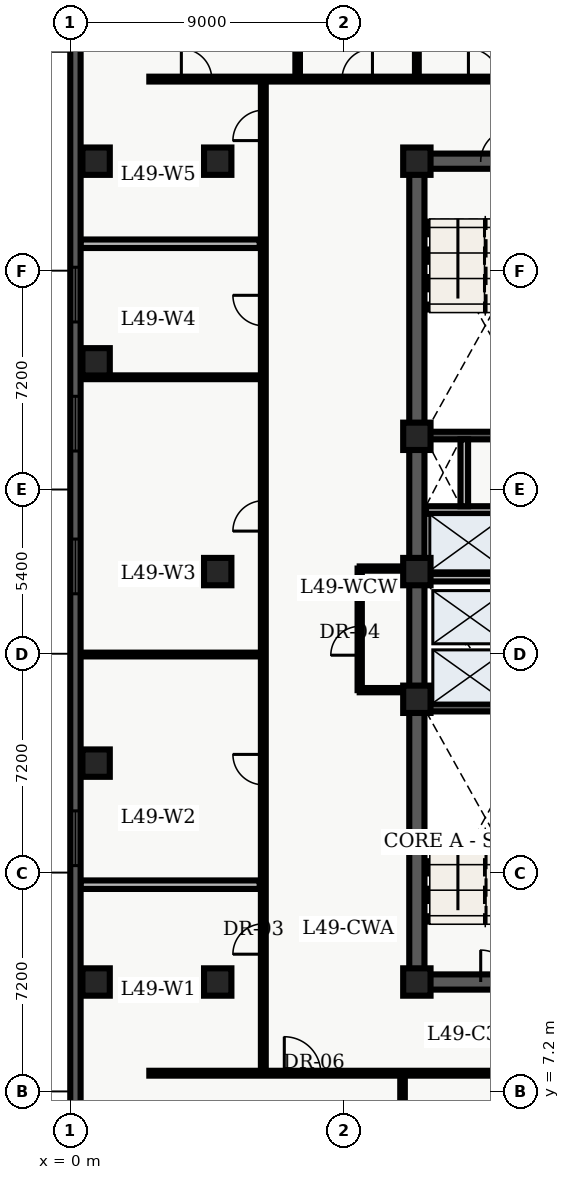
"""IFC4 building model, lengths in metres.
Left out: names, types, materials, properties, quantities, classifications, styles, units other than length and angle.
Written with IfcOpenShell. Run it as: python <this file> out.ifc"""

import sys

from ifc_helpers import new_model, entity, si_unit, converted_unit, direction, frame, origin_with_axes, origin_2d_with_axis, place, context, subcontext, project, spatial, polyline, rectangle, outline, extrude, element, fill, save


model = new_model("IFC4")
c1 = context("Model", 3, precision=1e-05, world=origin_with_axes(), true_north=direction((0.0, 1.0)))
c2 = subcontext(c1, "Body", "Model", "MODEL_VIEW")
j1 = project(units=[si_unit("LENGTHUNIT", "METRE"), converted_unit("PLANEANGLEUNIT", "DEGREE", entity("IfcPlaneAngleMeasure", 0.017), si_unit("PLANEANGLEUNIT", "RADIAN"), dimensions=[0, 0, 0, 0, 0, 0, 0])], contexts=[c1])
p1 = place(None, origin_with_axes())
s1 = spatial("IfcSite", under=j1, at=p1, CompositionType="ELEMENT")
p2 = place(p1, origin_with_axes())
s2 = spatial("IfcBuilding", under=s1, at=p2, CompositionType="ELEMENT")
p3 = place(p2, frame((0.0, 0.0, 200.4), z_axis=(0.0, 0.0, 1.0), x_axis=(1.0, 0.0, 0.0)))
s3 = spatial("IfcBuildingStorey", under=s2, at=p3, CompositionType="ELEMENT", Elevation=200.4)
p4 = place(p3, frame((11.4, 10.8, 0.0), z_axis=(0.0, 0.0, 1.0), x_axis=(0.0, 1.0, 0.0)))
e1 = element("IfcWall", 1, at=p4, inside=s3, PredefinedType="SHEAR", context=c2, shape_type="SweptSolid", body=[
    extrude(outline(polyline([(0.0, -0.25), (27.0, -0.25), (27.0, 0.25), (0.0, 0.25), (0.0, -0.25)])), origin_with_axes(), (0.0, 0.0, 1.0), 3.66),
])
p5 = place(p3, frame((11.4, 10.8, 0.0), z_axis=(0.0, 0.0, 1.0), x_axis=(1.0, 0.0, 0.0)))
e2 = element("IfcWall", 2, at=p5, inside=s3, PredefinedType="SHEAR", context=c2, shape_type="SweptSolid", body=[
    extrude(outline(polyline([(0.0, -0.25), (7.2, -0.25), (7.2, 0.25), (0.0, 0.25), (0.0, -0.25)])), origin_with_axes(), (0.0, 0.0, 1.0), 3.66),
])
p6 = place(p5, frame((2.625, 0.0, 0.0), z_axis=(0.0, 0.0, 1.0), x_axis=(1.0, 0.0, 0.0)))
e3 = element("IfcOpeningElement", 3, at=p6, cuts=e2, PredefinedType="OPENING", context=c2, shape_type="SweptSolid", body=[
    extrude(rectangle(XDim=1.05, YDim=0.52, at=origin_2d_with_axis()), origin_with_axes(), (0.0, 0.0, 1.0), 2.15),
])
p7 = place(p3, frame((11.4, 37.8, 0.0), z_axis=(0.0, 0.0, 1.0), x_axis=(1.0, 0.0, 0.0)))
e4 = element("IfcWall", 4, at=p7, inside=s3, PredefinedType="SHEAR", context=c2, shape_type="SweptSolid", body=[
    extrude(outline(polyline([(0.0, -0.25), (7.2, -0.25), (7.2, 0.25), (0.0, 0.25), (0.0, -0.25)])), origin_with_axes(), (0.0, 0.0, 1.0), 3.66),
])
p8 = place(p7, frame((2.625, 0.0, 0.0), z_axis=(0.0, 0.0, 1.0), x_axis=(1.0, 0.0, 0.0)))
e5 = element("IfcOpeningElement", 5, at=p8, cuts=e4, PredefinedType="OPENING", context=c2, shape_type="SweptSolid", body=[
    extrude(rectangle(XDim=1.05, YDim=0.52, at=origin_2d_with_axis()), origin_with_axes(), (0.0, 0.0, 1.0), 2.15),
])
for number, where, z_axis, x_axis in (
    (6, (11.65, 19.825, 0.0), (0.0, 0.0, 1.0), (1.0, 0.0, 0.0)),
    (7, (11.65, 28.775, 0.0), (0.0, 0.0, 1.0), (1.0, 0.0, 0.0)),
):
    element("IfcWall", number, at=place(p3, frame(where, z_axis=z_axis, x_axis=x_axis)), inside=s3, PredefinedType="SHEAR", context=c2, shape_type="SweptSolid", body=[
        extrude(outline(polyline([(0.0, -0.125), (6.7, -0.125), (6.7, 0.125), (0.0, 0.125), (0.0, -0.125)])), origin_with_axes(), (0.0, 0.0, 1.0), 3.66),
    ])
p9 = place(p3, frame((11.7, 24.1, 0.0), z_axis=(0.0, 0.0, 1.0), x_axis=(1.0, 0.0, 0.0)))
e8 = element("IfcWall", 8, at=p9, inside=s3, PredefinedType="SOLIDWALL", context=c2, shape_type="SweptSolid", body=[
    extrude(outline(polyline([(0.0, -0.125), (6.6, -0.125), (6.6, 0.125), (0.0, 0.125), (0.0, -0.125)])), origin_with_axes(), (0.0, 0.0, 1.0), 2.7),
])
p10 = place(p9, frame((3.75, 0.0, 0.0), z_axis=(0.0, 0.0, 1.0), x_axis=(1.0, 0.0, 0.0)))
e9 = element("IfcOpeningElement", 9, at=p10, cuts=e8, PredefinedType="OPENING", context=c2, shape_type="SweptSolid", body=[
    extrude(rectangle(XDim=0.9, YDim=0.27, at=origin_2d_with_axis()), origin_with_axes(), (0.0, 0.0, 1.0), 2.15),
])
p11 = place(p3, frame((11.7, 26.325, 0.0), z_axis=(0.0, 0.0, 1.0), x_axis=(1.0, 0.0, 0.0)))
e10 = element("IfcWall", 10, at=p11, inside=s3, PredefinedType="SOLIDWALL", context=c2, shape_type="SweptSolid", body=[
    extrude(outline(polyline([(0.0, -0.125), (6.6, -0.125), (6.6, 0.125), (0.0, 0.125), (0.0, -0.125)])), origin_with_axes(), (0.0, 0.0, 1.0), 2.7),
])
p12 = place(p11, frame((3.5, 0.0, 0.0), z_axis=(0.0, 0.0, 1.0), x_axis=(1.0, 0.0, 0.0)))
e11 = element("IfcOpeningElement", 11, at=p12, cuts=e10, PredefinedType="OPENING", context=c2, shape_type="SweptSolid", body=[
    extrude(rectangle(XDim=0.9, YDim=0.27, at=origin_2d_with_axis()), origin_with_axes(), (0.0, 0.0, 1.0), 2.15),
])
p13 = place(p3, frame((12.96, 26.45, 0.0), z_axis=(0.0, 0.0, 1.0), x_axis=(0.0, 1.0, 0.0)))
e12 = element("IfcWall", 12, at=p13, inside=s3, PredefinedType="SOLIDWALL", context=c2, shape_type="SweptSolid", body=[
    extrude(outline(polyline([(0.0, -0.125), (2.2, -0.125), (2.2, 0.125), (0.0, 0.125), (0.0, -0.125)])), origin_with_axes(), (0.0, 0.0, 1.0), 2.7),
])
for number, where, z_axis, x_axis in (
    (13, (11.4, 10.8, 0.0), (0.0, 0.0, 1.0), (1.0, 0.0, 0.0)),
    (14, (11.4, 20.1, 0.0), (0.0, 0.0, 1.0), (1.0, 0.0, 0.0)),
    (15, (11.4, 24.3, 0.0), (0.0, 0.0, 1.0), (1.0, 0.0, 0.0)),
    (16, (11.4, 28.75, 0.0), (0.0, 0.0, 1.0), (1.0, 0.0, 0.0)),
    (17, (11.4, 37.8, 0.0), (0.0, 0.0, 1.0), (1.0, 0.0, 0.0)),
    (18, (4.85, 10.8, 0.0), (0.0, 0.0, 1.0), (1.0, 0.0, 0.0)),
    (19, (4.85, 24.3, 0.0), (0.0, 0.0, 1.0), (1.0, 0.0, 0.0)),
    (20, (4.85, 37.8, 0.0), (0.0, 0.0, 1.0), (1.0, 0.0, 0.0)),
    (21, (0.85, 10.8, 0.0), (0.0, 0.0, 1.0), (1.0, 0.0, 0.0)),
    (22, (0.85, 18.0, 0.0), (0.0, 0.0, 1.0), (1.0, 0.0, 0.0)),
    (23, (0.85, 31.2, 0.0), (0.0, 0.0, 1.0), (1.0, 0.0, 0.0)),
    (24, (0.85, 37.8, 0.0), (0.0, 0.0, 1.0), (1.0, 0.0, 0.0)),
):
    element("IfcColumn", number, at=place(p3, frame(where, z_axis=z_axis, x_axis=x_axis)), inside=s3, PredefinedType="COLUMN", context=c2, shape_type="SweptSolid", body=[
        extrude(rectangle(XDim=0.9, YDim=0.9, at=origin_2d_with_axis()), origin_with_axes(), (0.0, 0.0, 1.0), 3.9),
    ])
p14 = place(p3, frame((9.52, 20.4, 0.0), z_axis=(0.0, 0.0, 1.0), x_axis=(0.0, 1.0, 0.0)))
e25 = element("IfcWall", 25, at=p14, inside=s3, PredefinedType="PARTITIONING", context=c2, shape_type="SweptSolid", body=[
    extrude(outline(polyline([(0.0, -0.07), (4.0, -0.07), (4.0, 0.07), (0.0, 0.07), (0.0, -0.07)])), origin_with_axes(), (0.0, 0.0, 1.0), 2.7),
])
p15 = place(p14, frame((1.625, 0.0, 0.0), z_axis=(0.0, 0.0, 1.0), x_axis=(1.0, 0.0, 0.0)))
e26 = element("IfcOpeningElement", 26, at=p15, cuts=e25, PredefinedType="OPENING", context=c2, shape_type="SweptSolid", body=[
    extrude(rectangle(XDim=0.95, YDim=0.16, at=origin_2d_with_axis()), origin_with_axes(), (0.0, 0.0, 1.0), 2.15),
])
for number, where, z_axis, x_axis in (
    (27, (9.52, 20.4, 0.0), (0.0, 0.0, 1.0), (1.0, 0.0, 0.0)),
    (28, (9.52, 24.4, 0.0), (0.0, 0.0, 1.0), (1.0, 0.0, 0.0)),
):
    element("IfcWall", number, at=place(p3, frame(where, z_axis=z_axis, x_axis=x_axis)), inside=s3, PredefinedType="PARTITIONING", context=c2, shape_type="SweptSolid", body=[
        extrude(outline(polyline([(0.0, -0.07), (1.58, -0.07), (1.58, 0.07), (0.0, 0.07), (0.0, -0.07)])), origin_with_axes(), (0.0, 0.0, 1.0), 2.7),
    ])
p16 = place(p3, frame((2.6, 7.8, 0.0), z_axis=(0.0, 0.0, 1.0), x_axis=(1.0, 0.0, 0.0)))
e29 = element("IfcWall", 29, at=p16, inside=s3, PredefinedType="PARTITIONING", context=c2, shape_type="SweptSolid", body=[
    extrude(outline(polyline([(0.0, -0.08), (18.55, -0.08), (18.55, 0.08), (0.0, 0.08), (0.0, -0.08)])), origin_with_axes(), (0.0, 0.0, 1.0), 2.7),
])
p17 = place(p16, frame((5.04, 0.0, 0.0), z_axis=(0.0, 0.0, 1.0), x_axis=(1.0, 0.0, 0.0)))
e30 = element("IfcOpeningElement", 30, at=p17, cuts=e29, PredefinedType="OPENING", context=c2, shape_type="SweptSolid", body=[
    extrude(rectangle(XDim=1.2, YDim=0.18, at=origin_2d_with_axis()), origin_with_axes(), (0.0, 0.0, 1.0), 2.2),
])
p18 = place(p16, frame((13.415, 0.0, 0.0), z_axis=(0.0, 0.0, 1.0), x_axis=(1.0, 0.0, 0.0)))
e31 = element("IfcOpeningElement", 31, at=p18, cuts=e29, PredefinedType="OPENING", context=c2, shape_type="SweptSolid", body=[
    extrude(rectangle(XDim=1.0, YDim=0.18, at=origin_2d_with_axis()), origin_with_axes(), (0.0, 0.0, 1.0), 2.15),
])
p19 = place(p3, frame((2.6, 40.5, 0.0), z_axis=(0.0, 0.0, 1.0), x_axis=(1.0, 0.0, 0.0)))
e32 = element("IfcWall", 32, at=p19, inside=s3, PredefinedType="PARTITIONING", context=c2, shape_type="SweptSolid", body=[
    extrude(outline(polyline([(0.0, -0.08), (26.177, -0.08), (26.177, 0.08), (0.0, 0.08), (0.0, -0.08)])), origin_with_axes(), (0.0, 0.0, 1.0), 2.7),
])
p20 = place(p19, frame((1.554, 0.0, 0.0), z_axis=(0.0, 0.0, 1.0), x_axis=(1.0, 0.0, 0.0)))
e33 = element("IfcOpeningElement", 33, at=p20, cuts=e32, PredefinedType="OPENING", context=c2, shape_type="SweptSolid", body=[
    extrude(rectangle(XDim=1.0, YDim=0.18, at=origin_2d_with_axis()), origin_with_axes(), (0.0, 0.0, 1.0), 2.15),
])
p21 = place(p19, frame((6.84, 0.0, 0.0), z_axis=(0.0, 0.0, 1.0), x_axis=(1.0, 0.0, 0.0)))
e34 = element("IfcOpeningElement", 34, at=p21, cuts=e32, PredefinedType="OPENING", context=c2, shape_type="SweptSolid", body=[
    extrude(rectangle(XDim=1.0, YDim=0.18, at=origin_2d_with_axis()), origin_with_axes(), (0.0, 0.0, 1.0), 2.15),
])
p22 = place(p19, frame((10.996, 0.0, 0.0), z_axis=(0.0, 0.0, 1.0), x_axis=(1.0, 0.0, 0.0)))
e35 = element("IfcOpeningElement", 35, at=p22, cuts=e32, PredefinedType="OPENING", context=c2, shape_type="SweptSolid", body=[
    extrude(rectangle(XDim=1.0, YDim=0.18, at=origin_2d_with_axis()), origin_with_axes(), (0.0, 0.0, 1.0), 2.15),
])
p23 = place(p19, frame((15.636, 0.0, 0.0), z_axis=(0.0, 0.0, 1.0), x_axis=(1.0, 0.0, 0.0)))
e36 = element("IfcOpeningElement", 36, at=p23, cuts=e32, PredefinedType="OPENING", context=c2, shape_type="SweptSolid", body=[
    extrude(rectangle(XDim=1.0, YDim=0.18, at=origin_2d_with_axis()), origin_with_axes(), (0.0, 0.0, 1.0), 2.15),
])
p24 = place(p3, frame((6.35, 7.8, 0.0), z_axis=(0.0, 0.0, 1.0), x_axis=(0.0, 1.0, 0.0)))
e37 = element("IfcWall", 37, at=p24, inside=s3, PredefinedType="PARTITIONING", context=c2, shape_type="SweptSolid", body=[
    extrude(outline(polyline([(0.0, -0.08), (32.7, -0.08), (32.7, 0.08), (0.0, 0.08), (0.0, -0.08)])), origin_with_axes(), (0.0, 0.0, 1.0), 2.7),
])
p25 = place(p24, frame((4.415, 0.0, 0.0), z_axis=(0.0, 0.0, 1.0), x_axis=(1.0, 0.0, 0.0)))
e38 = element("IfcOpeningElement", 38, at=p25, cuts=e37, PredefinedType="OPENING", context=c2, shape_type="SweptSolid", body=[
    extrude(rectangle(XDim=1.0, YDim=0.18, at=origin_2d_with_axis()), origin_with_axes(), (0.0, 0.0, 1.0), 2.15),
])
p26 = place(p24, frame((9.986, 0.0, 0.0), z_axis=(0.0, 0.0, 1.0), x_axis=(1.0, 0.0, 0.0)))
e39 = element("IfcOpeningElement", 39, at=p26, cuts=e37, PredefinedType="OPENING", context=c2, shape_type="SweptSolid", body=[
    extrude(rectangle(XDim=1.0, YDim=0.18, at=origin_2d_with_axis()), origin_with_axes(), (0.0, 0.0, 1.0), 2.15),
])
p27 = place(p24, frame((18.332, 0.0, 0.0), z_axis=(0.0, 0.0, 1.0), x_axis=(1.0, 0.0, 0.0)))
e40 = element("IfcOpeningElement", 40, at=p27, cuts=e37, PredefinedType="OPENING", context=c2, shape_type="SweptSolid", body=[
    extrude(rectangle(XDim=1.0, YDim=0.18, at=origin_2d_with_axis()), origin_with_axes(), (0.0, 0.0, 1.0), 2.15),
])
p28 = place(p24, frame((25.088, 0.0, 0.0), z_axis=(0.0, 0.0, 1.0), x_axis=(1.0, 0.0, 0.0)))
e41 = element("IfcOpeningElement", 41, at=p28, cuts=e37, PredefinedType="OPENING", context=c2, shape_type="SweptSolid", body=[
    extrude(rectangle(XDim=1.0, YDim=0.18, at=origin_2d_with_axis()), origin_with_axes(), (0.0, 0.0, 1.0), 2.15),
])
p29 = place(p24, frame((31.177, 0.0, 0.0), z_axis=(0.0, 0.0, 1.0), x_axis=(1.0, 0.0, 0.0)))
e42 = element("IfcOpeningElement", 42, at=p29, cuts=e37, PredefinedType="OPENING", context=c2, shape_type="SweptSolid", body=[
    extrude(rectangle(XDim=1.0, YDim=0.18, at=origin_2d_with_axis()), origin_with_axes(), (0.0, 0.0, 1.0), 2.15),
])
p30 = place(p3, frame((0.335, 14.001, 0.0), z_axis=(0.0, 0.0, 1.0), x_axis=(1.0, 0.0, 0.0)))
e43 = element("IfcWall", 43, at=p30, inside=s3, PredefinedType="PARTITIONING", context=c2, shape_type="SweptSolid", body=[
    extrude(outline(polyline([(0.0, -0.14), (5.895, -0.14), (5.895, 0.14), (0.0, 0.14), (0.0, -0.14)])), origin_with_axes(), (0.0, 0.0, 1.0), 2.7),
])
for number, where, z_axis, x_axis in (
    (44, (0.335, 21.572, 0.0), (0.0, 0.0, 1.0), (1.0, 0.0, 0.0)),
    (45, (0.335, 30.692, 0.0), (0.0, 0.0, 1.0), (1.0, 0.0, 0.0)),
):
    element("IfcWall", number, at=place(p3, frame(where, z_axis=z_axis, x_axis=x_axis)), inside=s3, PredefinedType="PARTITIONING", context=c2, shape_type="SweptSolid", body=[
        extrude(outline(polyline([(0.0, -0.062), (5.895, -0.062), (5.895, 0.062), (0.0, 0.062), (0.0, -0.062)])), origin_with_axes(), (0.0, 0.0, 1.0), 2.7),
    ])
p31 = place(p3, frame((0.335, 35.084, 0.0), z_axis=(0.0, 0.0, 1.0), x_axis=(1.0, 0.0, 0.0)))
e46 = element("IfcWall", 46, at=p31, inside=s3, PredefinedType="PARTITIONING", context=c2, shape_type="SweptSolid", body=[
    extrude(outline(polyline([(0.0, -0.14), (5.895, -0.14), (5.895, 0.14), (0.0, 0.14), (0.0, -0.14)])), origin_with_axes(), (0.0, 0.0, 1.0), 2.7),
])
p32 = place(p3, frame((10.929, 0.335, 0.0), z_axis=(0.0, 0.0, 1.0), x_axis=(0.0, 1.0, 0.0)))
e47 = element("IfcWall", 47, at=p32, inside=s3, PredefinedType="PARTITIONING", context=c2, shape_type="SweptSolid", body=[
    extrude(outline(polyline([(0.0, -0.075), (7.365, -0.075), (7.365, 0.075), (0.0, 0.075), (0.0, -0.075)])), origin_with_axes(), (0.0, 0.0, 1.0), 2.7),
])
p33 = place(p3, frame((7.479, 40.6, 0.0), z_axis=(0.0, 0.0, 1.0), x_axis=(0.0, 1.0, 0.0)))
e48 = element("IfcWall", 48, at=p33, inside=s3, PredefinedType="PARTITIONING", context=c2, shape_type="SweptSolid", body=[
    extrude(outline(polyline([(0.0, -0.075), (7.665, -0.075), (7.665, 0.075), (0.0, 0.075), (0.0, -0.075)])), origin_with_axes(), (0.0, 0.0, 1.0), 2.7),
])
p34 = place(p3, frame((11.4, 40.6, 0.0), z_axis=(0.0, 0.0, 1.0), x_axis=(0.0, 1.0, 0.0)))
e49 = element("IfcWall", 49, at=p34, inside=s3, PredefinedType="PARTITIONING", context=c2, shape_type="SweptSolid", body=[
    extrude(outline(polyline([(0.0, -0.062), (7.665, -0.062), (7.665, 0.062), (0.0, 0.062), (0.0, -0.062)])), origin_with_axes(), (0.0, 0.0, 1.0), 2.7),
])
p35 = place(p3, frame((0.17, 2.74, 0.0), z_axis=(0.0, 0.0, 1.0), x_axis=(0.0, 1.0, 0.0)))
e50 = element("IfcWall", 50, at=p35, inside=s3, PredefinedType="SOLIDWALL", context=c2, shape_type="SweptSolid", body=[
    extrude(outline(polyline([(0.0, -0.17), (43.46, -0.17), (43.46, 0.17), (0.0, 0.17), (0.0, -0.17)])), origin_with_axes(), (0.0, 0.0, 1.0), 3.66),
])
p36 = place(p35, frame((2.948, 0.0, 0.45), z_axis=(0.0, 0.0, 1.0), x_axis=(1.0, 0.0, 0.0)))
e51 = element("IfcOpeningElement", 51, at=p36, cuts=e50, PredefinedType="OPENING", context=c2, shape_type="SweptSolid", body=[
    extrude(rectangle(XDim=1.8, YDim=0.36, at=origin_2d_with_axis()), origin_with_axes(), (0.0, 0.0, 1.0), 2.1),
])
p37 = place(p35, frame((12.789, 0.0, 0.45), z_axis=(0.0, 0.0, 1.0), x_axis=(1.0, 0.0, 0.0)))
e52 = element("IfcOpeningElement", 52, at=p37, cuts=e50, PredefinedType="OPENING", context=c2, shape_type="SweptSolid", body=[
    extrude(rectangle(XDim=1.8, YDim=0.36, at=origin_2d_with_axis()), origin_with_axes(), (0.0, 0.0, 1.0), 2.1),
])
p38 = place(p35, frame((21.73, 0.0, 0.45), z_axis=(0.0, 0.0, 1.0), x_axis=(1.0, 0.0, 0.0)))
e53 = element("IfcOpeningElement", 53, at=p38, cuts=e50, PredefinedType="OPENING", context=c2, shape_type="SweptSolid", body=[
    extrude(rectangle(XDim=1.8, YDim=0.36, at=origin_2d_with_axis()), origin_with_axes(), (0.0, 0.0, 1.0), 2.1),
])
p39 = place(p35, frame((26.426, 0.0, 0.45), z_axis=(0.0, 0.0, 1.0), x_axis=(1.0, 0.0, 0.0)))
e54 = element("IfcOpeningElement", 54, at=p39, cuts=e50, PredefinedType="OPENING", context=c2, shape_type="SweptSolid", body=[
    extrude(rectangle(XDim=1.8, YDim=0.36, at=origin_2d_with_axis()), origin_with_axes(), (0.0, 0.0, 1.0), 2.1),
])
p40 = place(p35, frame((30.671, 0.0, 0.45), z_axis=(0.0, 0.0, 1.0), x_axis=(1.0, 0.0, 0.0)))
e55 = element("IfcOpeningElement", 55, at=p40, cuts=e50, PredefinedType="OPENING", context=c2, shape_type="SweptSolid", body=[
    extrude(rectangle(XDim=1.8, YDim=0.36, at=origin_2d_with_axis()), origin_with_axes(), (0.0, 0.0, 1.0), 2.1),
])
p41 = place(p35, frame((40.062, 0.0, 0.45), z_axis=(0.0, 0.0, 1.0), x_axis=(1.0, 0.0, 0.0)))
e56 = element("IfcOpeningElement", 56, at=p41, cuts=e50, PredefinedType="OPENING", context=c2, shape_type="SweptSolid", body=[
    extrude(rectangle(XDim=1.8, YDim=0.36, at=origin_2d_with_axis()), origin_with_axes(), (0.0, 0.0, 1.0), 2.1),
])
p42 = place(p5, frame((2.625, 0.0, 0.0), z_axis=(0.0, 0.0, 1.0), x_axis=(1.0, 0.0, 0.0)))
e57 = element("IfcDoor", 57, at=p42, inside=s3, OperationType="SINGLE_SWING_LEFT", PredefinedType="DOOR", context=c2, shape_type="SweptSolid", body=[
    extrude(rectangle(XDim=1.05, YDim=0.09, at=origin_2d_with_axis()), origin_with_axes(), (0.0, 0.0, 1.0), 2.15),
])
fill(e3, e57)
p43 = place(p7, frame((2.625, 0.0, 0.0), z_axis=(0.0, 0.0, 1.0), x_axis=(1.0, 0.0, 0.0)))
e58 = element("IfcDoor", 58, at=p43, inside=s3, OperationType="SINGLE_SWING_RIGHT", PredefinedType="DOOR", context=c2, shape_type="SweptSolid", body=[
    extrude(rectangle(XDim=1.05, YDim=0.09, at=origin_2d_with_axis()), origin_with_axes(), (0.0, 0.0, 1.0), 2.15),
])
fill(e5, e58)
p44 = place(p14, frame((1.625, 0.0, 0.0), z_axis=(0.0, 0.0, 1.0), x_axis=(1.0, 0.0, 0.0)))
e59 = element("IfcDoor", 59, at=p44, inside=s3, OperationType="SINGLE_SWING_LEFT", PredefinedType="DOOR", context=c2, shape_type="SweptSolid", body=[
    extrude(rectangle(XDim=0.95, YDim=0.084, at=origin_2d_with_axis()), origin_with_axes(), (0.0, 0.0, 1.0), 2.15),
])
fill(e26, e59)
p45 = place(p24, frame((4.415, 0.0, 0.0), z_axis=(0.0, 0.0, 1.0), x_axis=(1.0, 0.0, 0.0)))
e60 = element("IfcDoor", 60, at=p45, inside=s3, OperationType="SINGLE_SWING_LEFT", PredefinedType="DOOR", context=c2, shape_type="SweptSolid", body=[
    extrude(rectangle(XDim=1.0, YDim=0.09, at=origin_2d_with_axis()), origin_with_axes(), (0.0, 0.0, 1.0), 2.15),
])
fill(e38, e60)
p46 = place(p24, frame((9.986, 0.0, 0.0), z_axis=(0.0, 0.0, 1.0), x_axis=(1.0, 0.0, 0.0)))
e61 = element("IfcDoor", 61, at=p46, inside=s3, OperationType="SINGLE_SWING_RIGHT", PredefinedType="DOOR", context=c2, shape_type="SweptSolid", body=[
    extrude(rectangle(XDim=1.0, YDim=0.09, at=origin_2d_with_axis()), origin_with_axes(), (0.0, 0.0, 1.0), 2.15),
])
fill(e39, e61)
p47 = place(p24, frame((18.332, 0.0, 0.0), z_axis=(0.0, 0.0, 1.0), x_axis=(1.0, 0.0, 0.0)))
e62 = element("IfcDoor", 62, at=p47, inside=s3, OperationType="SINGLE_SWING_LEFT", PredefinedType="DOOR", context=c2, shape_type="SweptSolid", body=[
    extrude(rectangle(XDim=1.0, YDim=0.09, at=origin_2d_with_axis()), origin_with_axes(), (0.0, 0.0, 1.0), 2.15),
])
fill(e40, e62)
p48 = place(p24, frame((25.088, 0.0, 0.0), z_axis=(0.0, 0.0, 1.0), x_axis=(1.0, 0.0, 0.0)))
e63 = element("IfcDoor", 63, at=p48, inside=s3, OperationType="SINGLE_SWING_RIGHT", PredefinedType="DOOR", context=c2, shape_type="SweptSolid", body=[
    extrude(rectangle(XDim=1.0, YDim=0.09, at=origin_2d_with_axis()), origin_with_axes(), (0.0, 0.0, 1.0), 2.15),
])
fill(e41, e63)
p49 = place(p24, frame((31.177, 0.0, 0.0), z_axis=(0.0, 0.0, 1.0), x_axis=(1.0, 0.0, 0.0)))
e64 = element("IfcDoor", 64, at=p49, inside=s3, OperationType="SINGLE_SWING_LEFT", PredefinedType="DOOR", context=c2, shape_type="SweptSolid", body=[
    extrude(rectangle(XDim=1.0, YDim=0.09, at=origin_2d_with_axis()), origin_with_axes(), (0.0, 0.0, 1.0), 2.15),
])
fill(e42, e64)
p50 = place(p16, frame((5.04, 0.0, 0.0), z_axis=(0.0, 0.0, 1.0), x_axis=(1.0, 0.0, 0.0)))
e65 = element("IfcDoor", 65, at=p50, inside=s3, OperationType="SINGLE_SWING_LEFT", PredefinedType="DOOR", context=c2, shape_type="SweptSolid", body=[
    extrude(rectangle(XDim=1.2, YDim=0.09, at=origin_2d_with_axis()), origin_with_axes(), (0.0, 0.0, 1.0), 2.2),
])
fill(e30, e65)
p51 = place(p19, frame((1.554, 0.0, 0.0), z_axis=(0.0, 0.0, 1.0), x_axis=(1.0, 0.0, 0.0)))
e66 = element("IfcDoor", 66, at=p51, inside=s3, OperationType="SINGLE_SWING_LEFT", PredefinedType="DOOR", context=c2, shape_type="SweptSolid", body=[
    extrude(rectangle(XDim=1.0, YDim=0.09, at=origin_2d_with_axis()), origin_with_axes(), (0.0, 0.0, 1.0), 2.15),
])
fill(e33, e66)
p52 = place(p19, frame((6.84, 0.0, 0.0), z_axis=(0.0, 0.0, 1.0), x_axis=(1.0, 0.0, 0.0)))
e67 = element("IfcDoor", 67, at=p52, inside=s3, OperationType="SINGLE_SWING_RIGHT", PredefinedType="DOOR", context=c2, shape_type="SweptSolid", body=[
    extrude(rectangle(XDim=1.0, YDim=0.09, at=origin_2d_with_axis()), origin_with_axes(), (0.0, 0.0, 1.0), 2.15),
])
fill(e34, e67)
p53 = place(p19, frame((10.996, 0.0, 0.0), z_axis=(0.0, 0.0, 1.0), x_axis=(1.0, 0.0, 0.0)))
e68 = element("IfcDoor", 68, at=p53, inside=s3, OperationType="SINGLE_SWING_LEFT", PredefinedType="DOOR", context=c2, shape_type="SweptSolid", body=[
    extrude(rectangle(XDim=1.0, YDim=0.09, at=origin_2d_with_axis()), origin_with_axes(), (0.0, 0.0, 1.0), 2.15),
])
fill(e35, e68)
p54 = place(p35, frame((12.789, 0.0, 0.45), z_axis=(0.0, 0.0, 1.0), x_axis=(1.0, 0.0, 0.0)))
e69 = element("IfcWindow", 69, at=p54, inside=s3, PredefinedType="WINDOW", context=c2, shape_type="SweptSolid", body=[
    extrude(rectangle(XDim=1.8, YDim=0.09, at=origin_2d_with_axis()), origin_with_axes(), (0.0, 0.0, 1.0), 2.1),
])
fill(e52, e69)
p55 = place(p35, frame((21.73, 0.0, 0.45), z_axis=(0.0, 0.0, 1.0), x_axis=(1.0, 0.0, 0.0)))
e70 = element("IfcWindow", 70, at=p55, inside=s3, PredefinedType="WINDOW", context=c2, shape_type="SweptSolid", body=[
    extrude(rectangle(XDim=1.8, YDim=0.09, at=origin_2d_with_axis()), origin_with_axes(), (0.0, 0.0, 1.0), 2.1),
])
fill(e53, e70)
p56 = place(p35, frame((26.426, 0.0, 0.45), z_axis=(0.0, 0.0, 1.0), x_axis=(1.0, 0.0, 0.0)))
e71 = element("IfcWindow", 71, at=p56, inside=s3, PredefinedType="WINDOW", context=c2, shape_type="SweptSolid", body=[
    extrude(rectangle(XDim=1.8, YDim=0.09, at=origin_2d_with_axis()), origin_with_axes(), (0.0, 0.0, 1.0), 2.1),
])
fill(e54, e71)
p57 = place(p35, frame((30.671, 0.0, 0.45), z_axis=(0.0, 0.0, 1.0), x_axis=(1.0, 0.0, 0.0)))
e72 = element("IfcWindow", 72, at=p57, inside=s3, PredefinedType="WINDOW", context=c2, shape_type="SweptSolid", body=[
    extrude(rectangle(XDim=1.8, YDim=0.09, at=origin_2d_with_axis()), origin_with_axes(), (0.0, 0.0, 1.0), 2.1),
])
fill(e55, e72)
save(model, sys.argv[1])
